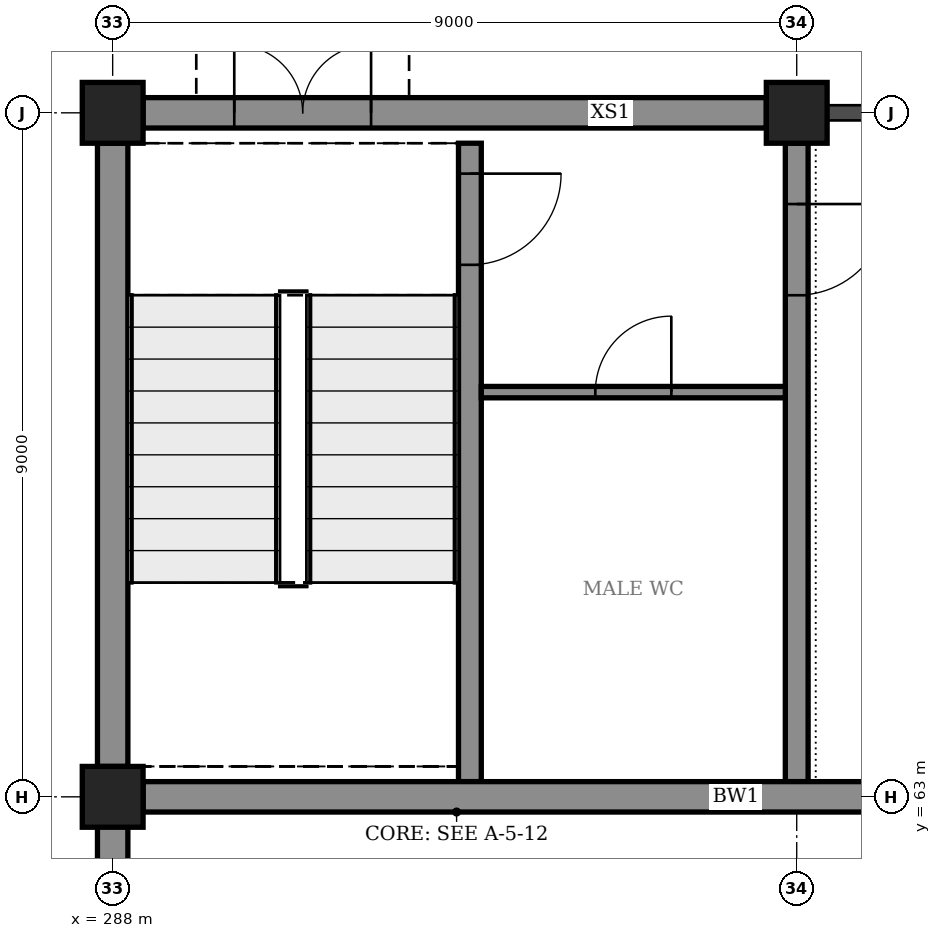
"""IFC4 building model, lengths in metres.
Left out: names, types, materials, properties, quantities, classifications, styles, units other than length and angle.
Written with IfcOpenShell. Run it as: python <this file> out.ifc"""

import sys

from ifc_helpers import new_model, si_unit, direction, frame, frame_2d, origin, origin_2d, place, context, subcontext, project, spatial, polyline, rectangle, outline, extrude, element, fill, save


model = new_model("IFC4")
c1 = context("Model", 3, precision=1e-05, world=origin(), true_north=direction((0.0, 1.0)))
c2 = subcontext(c1, "Body", "Model", "MODEL_VIEW")
j1 = project(units=[si_unit("LENGTHUNIT", "METRE"), si_unit("PLANEANGLEUNIT", "RADIAN")], contexts=[c1])
p1 = place(None, origin())
s1 = spatial("IfcSite", under=j1, at=p1, CompositionType="ELEMENT")
p2 = place(p1, origin())
s2 = spatial("IfcBuilding", under=s1, at=p2, CompositionType="ELEMENT")
p3 = place(p2, origin())
s3 = spatial("IfcBuildingStorey", under=s2, at=p3, CompositionType="ELEMENT", Elevation=0.0)
for number, where, z_axis, x_axis in (
    (1, (288.0, 63.0, -0.3), (0.0, 0.0, 1.0), (1.0, 0.0, 0.0)),
    (2, (288.0, 72.0, -0.3), (0.0, 0.0, 1.0), (1.0, 0.0, 0.0)),
    (3, (297.0, 72.0, -0.3), (0.0, 0.0, 1.0), (1.0, 0.0, 0.0)),
):
    element("IfcColumn", number, at=place(p3, frame(where, z_axis=z_axis, x_axis=x_axis)), inside=s3, PredefinedType="COLUMN", context=c2, shape_type="SweptSolid", body=[
        extrude(rectangle(XDim=0.8, YDim=0.8, at=origin_2d()), origin(), (0.0, 0.0, 1.0), 6.02),
    ])
p4 = place(p3, frame((288.4, 63.0, -0.3), z_axis=(0.0, 0.0, 1.0), x_axis=(1.0, 0.0, 0.0)))
e4 = element("IfcWall", 4, at=p4, inside=s3, PredefinedType="SHEAR", context=c2, shape_type="SweptSolid", body=[
    extrude(rectangle(XDim=62.2, YDim=0.4, at=frame_2d((31.1, 0.0))), origin(), (0.0, 0.0, 1.0), 10.625),
])
p5 = place(p4, frame((14.25, 0.0, 0.3)))
e5 = element("IfcOpeningElement", 5, at=p5, cuts=e4, PredefinedType="OPENING", context=c2, shape_type="SweptSolid", body=[
    extrude(rectangle(XDim=2.7, YDim=2.4, at=frame_2d((1.35, 1.2))), frame((0.0, 0.21, 0.0), z_axis=(0.0, -1.0, 0.0), x_axis=(1.0, 0.0, 0.0)), (0.0, 0.0, 1.0), 0.42),
])
p6 = place(p4, frame((19.45, 0.0, 0.3)))
e6 = element("IfcOpeningElement", 6, at=p6, cuts=e4, PredefinedType="OPENING", context=c2, shape_type="SweptSolid", body=[
    extrude(rectangle(XDim=2.7, YDim=2.4, at=frame_2d((1.35, 1.2))), frame((0.0, 0.21, 0.0), z_axis=(0.0, -1.0, 0.0), x_axis=(1.0, 0.0, 0.0)), (0.0, 0.0, 1.0), 0.42),
])
p7 = place(p4, frame((24.65, 0.0, 0.3)))
e7 = element("IfcOpeningElement", 7, at=p7, cuts=e4, PredefinedType="OPENING", context=c2, shape_type="SweptSolid", body=[
    extrude(rectangle(XDim=2.7, YDim=2.4, at=frame_2d((1.35, 1.2))), frame((0.0, 0.21, 0.0), z_axis=(0.0, -1.0, 0.0), x_axis=(1.0, 0.0, 0.0)), (0.0, 0.0, 1.0), 0.42),
])
p8 = place(p4, frame((29.85, 0.0, 0.3)))
e8 = element("IfcOpeningElement", 8, at=p8, cuts=e4, PredefinedType="OPENING", context=c2, shape_type="SweptSolid", body=[
    extrude(rectangle(XDim=2.7, YDim=2.4, at=frame_2d((1.35, 1.2))), frame((0.0, 0.21, 0.0), z_axis=(0.0, -1.0, 0.0), x_axis=(1.0, 0.0, 0.0)), (0.0, 0.0, 1.0), 0.42),
])
p9 = place(p4, frame((35.05, 0.0, 0.3)))
e9 = element("IfcOpeningElement", 9, at=p9, cuts=e4, PredefinedType="OPENING", context=c2, shape_type="SweptSolid", body=[
    extrude(rectangle(XDim=2.7, YDim=2.4, at=frame_2d((1.35, 1.2))), frame((0.0, 0.21, 0.0), z_axis=(0.0, -1.0, 0.0), x_axis=(1.0, 0.0, 0.0)), (0.0, 0.0, 1.0), 0.42),
])
p10 = place(p4, frame((40.25, 0.0, 0.3)))
e10 = element("IfcOpeningElement", 10, at=p10, cuts=e4, PredefinedType="OPENING", context=c2, shape_type="SweptSolid", body=[
    extrude(rectangle(XDim=2.7, YDim=2.4, at=frame_2d((1.35, 1.2))), frame((0.0, 0.21, 0.0), z_axis=(0.0, -1.0, 0.0), x_axis=(1.0, 0.0, 0.0)), (0.0, 0.0, 1.0), 0.42),
])
p11 = place(p4, frame((45.45, 0.0, 0.3)))
e11 = element("IfcOpeningElement", 11, at=p11, cuts=e4, PredefinedType="OPENING", context=c2, shape_type="SweptSolid", body=[
    extrude(rectangle(XDim=2.7, YDim=2.4, at=frame_2d((1.35, 1.2))), frame((0.0, 0.21, 0.0), z_axis=(0.0, -1.0, 0.0), x_axis=(1.0, 0.0, 0.0)), (0.0, 0.0, 1.0), 0.42),
])
p12 = place(p3, frame((288.0, 27.4, 0.0), z_axis=(0.0, 0.0, 1.0), x_axis=(0.0, 1.0, 0.0)))
e12 = element("IfcWall", 12, at=p12, inside=s3, PredefinedType="STANDARD", context=c2, shape_type="SweptSolid", body=[
    extrude(outline(polyline([(0.0, 0.0), (35.2, 0.0), (35.2, 9.75), (35.5, 9.75), (35.5, 17.708), (0.0, 11.448), (0.0, 0.0)])), frame((0.0, 0.2, 0.0), z_axis=(0.0, -1.0, 0.0), x_axis=(1.0, 0.0, 0.0)), (0.0, 0.0, 1.0), 0.4),
])
p13 = place(p12, frame((2.75, 0.0, 0.0)))
e13 = element("IfcOpeningElement", 13, at=p13, cuts=e12, PredefinedType="OPENING", context=c2, shape_type="SweptSolid", body=[
    extrude(rectangle(XDim=2.7, YDim=2.4, at=frame_2d((1.35, 1.2))), frame((0.0, 0.21, 0.0), z_axis=(0.0, -1.0, 0.0), x_axis=(1.0, 0.0, 0.0)), (0.0, 0.0, 1.0), 0.42),
])
p14 = place(p12, frame((11.75, 0.0, 0.0)))
e14 = element("IfcOpeningElement", 14, at=p14, cuts=e12, PredefinedType="OPENING", context=c2, shape_type="SweptSolid", body=[
    extrude(rectangle(XDim=2.7, YDim=2.4, at=frame_2d((1.35, 1.2))), frame((0.0, 0.21, 0.0), z_axis=(0.0, -1.0, 0.0), x_axis=(1.0, 0.0, 0.0)), (0.0, 0.0, 1.0), 0.42),
])
p15 = place(p12, frame((20.75, 0.0, 0.0)))
e15 = element("IfcOpeningElement", 15, at=p15, cuts=e12, PredefinedType="OPENING", context=c2, shape_type="SweptSolid", body=[
    extrude(rectangle(XDim=2.7, YDim=2.4, at=frame_2d((1.35, 1.2))), frame((0.0, 0.21, 0.0), z_axis=(0.0, -1.0, 0.0), x_axis=(1.0, 0.0, 0.0)), (0.0, 0.0, 1.0), 0.42),
])
p16 = place(p12, frame((29.75, 0.0, 0.0)))
e16 = element("IfcOpeningElement", 16, at=p16, cuts=e12, PredefinedType="OPENING", context=c2, shape_type="SweptSolid", body=[
    extrude(rectangle(XDim=2.7, YDim=2.4, at=frame_2d((1.35, 1.2))), frame((0.0, 0.21, 0.0), z_axis=(0.0, -1.0, 0.0), x_axis=(1.0, 0.0, 0.0)), (0.0, 0.0, 1.0), 0.42),
])
p17 = place(p3, frame((288.0, 63.4, 0.0), z_axis=(0.0, 0.0, 1.0), x_axis=(0.0, 1.0, 0.0)))
e17 = element("IfcWall", 17, at=p17, inside=s3, PredefinedType="STANDARD", context=c2, shape_type="SweptSolid", body=[
    extrude(rectangle(XDim=8.2, YDim=0.4, at=frame_2d((4.1, 0.0))), origin(), (0.0, 0.0, 1.0), 5.02),
])
p18 = place(p3, frame((288.4, 72.0, 0.0), z_axis=(0.0, 0.0, 1.0), x_axis=(1.0, 0.0, 0.0)))
e18 = element("IfcWall", 18, at=p18, inside=s3, PredefinedType="STANDARD", context=c2, shape_type="SweptSolid", body=[
    extrude(rectangle(XDim=8.2, YDim=0.4, at=frame_2d((4.1, 0.0))), origin(), (0.0, 0.0, 1.0), 5.02),
])
p19 = place(p18, frame((1.2, 0.0, 0.0)))
e19 = element("IfcOpeningElement", 19, at=p19, cuts=e18, PredefinedType="OPENING", context=c2, shape_type="SweptSolid", body=[
    extrude(rectangle(XDim=1.8, YDim=2.4, at=frame_2d((0.9, 1.2))), frame((0.0, 0.21, 0.0), z_axis=(0.0, -1.0, 0.0), x_axis=(1.0, 0.0, 0.0)), (0.0, 0.0, 1.0), 0.42),
])
p20 = place(p3, frame((292.7, 63.2, 0.0), z_axis=(0.0, 0.0, 1.0), x_axis=(0.0, 1.0, 0.0)))
e20 = element("IfcWall", 20, at=p20, inside=s3, PredefinedType="STANDARD", context=c2, shape_type="SweptSolid", body=[
    extrude(rectangle(XDim=8.4, YDim=0.3, at=frame_2d((4.2, 0.0))), origin(), (0.0, 0.0, 1.0), 5.72),
])
p21 = place(p20, frame((6.8, 0.0, 0.0)))
e21 = element("IfcOpeningElement", 21, at=p21, cuts=e20, PredefinedType="OPENING", context=c2, shape_type="SweptSolid", body=[
    extrude(rectangle(XDim=1.2, YDim=2.4, at=frame_2d((0.6, 1.2))), frame((0.0, 0.16, 0.0), z_axis=(0.0, -1.0, 0.0), x_axis=(1.0, 0.0, 0.0)), (0.0, 0.0, 1.0), 0.32),
])
p22 = place(p3, frame((297.0, 63.2, 0.0), z_axis=(0.0, 0.0, 1.0), x_axis=(0.0, 1.0, 0.0)))
e22 = element("IfcWall", 22, at=p22, inside=s3, PredefinedType="STANDARD", context=c2, shape_type="SweptSolid", body=[
    extrude(rectangle(XDim=8.4, YDim=0.3, at=frame_2d((4.2, 0.0))), origin(), (0.0, 0.0, 1.0), 5.02),
])
p23 = place(p22, frame((6.4, 0.0, 0.0)))
e23 = element("IfcOpeningElement", 23, at=p23, cuts=e22, PredefinedType="OPENING", context=c2, shape_type="SweptSolid", body=[
    extrude(rectangle(XDim=1.2, YDim=2.4, at=frame_2d((0.6, 1.2))), frame((0.0, 0.16, 0.0), z_axis=(0.0, -1.0, 0.0), x_axis=(1.0, 0.0, 0.0)), (0.0, 0.0, 1.0), 0.32),
])
p24 = place(p3, frame((292.85, 68.325, 0.0), z_axis=(0.0, 0.0, 1.0), x_axis=(1.0, 0.0, 0.0)))
e24 = element("IfcWall", 24, at=p24, inside=s3, PredefinedType="PARTITIONING", context=c2, shape_type="SweptSolid", body=[
    extrude(rectangle(XDim=4.0, YDim=0.15, at=frame_2d((2.0, 0.0))), origin(), (0.0, 0.0, 1.0), 5.72),
])
p25 = place(p24, frame((1.5, 0.0, 0.0)))
e25 = element("IfcOpeningElement", 25, at=p25, cuts=e24, PredefinedType="OPENING", context=c2, shape_type="SweptSolid", body=[
    extrude(rectangle(XDim=1.0, YDim=2.4, at=frame_2d((0.5, 1.2))), frame((0.0, 0.085, 0.0), z_axis=(0.0, -1.0, 0.0), x_axis=(1.0, 0.0, 0.0)), (0.0, 0.0, 1.0), 0.17),
])
p26 = place(p19, origin())
e26 = element("IfcDoor", 26, at=p26, inside=s3, OperationType="DOUBLE_DOOR_SINGLE_SWING", PredefinedType="DOOR", context=c2, shape_type="SweptSolid", body=[
    extrude(rectangle(XDim=1.8, YDim=2.4, at=frame_2d((0.9, 1.2))), frame((0.0, 0.025, 0.0), z_axis=(0.0, -1.0, 0.0), x_axis=(1.0, 0.0, 0.0)), (0.0, 0.0, 1.0), 0.05),
])
fill(e19, e26)
p27 = place(p21, frame((1.2, 0.0, 0.0), z_axis=(0.0, 0.0, 1.0), x_axis=(-1.0, 0.0, 0.0)))
e27 = element("IfcDoor", 27, at=p27, inside=s3, OperationType="SINGLE_SWING_RIGHT", PredefinedType="DOOR", context=c2, shape_type="SweptSolid", body=[
    extrude(rectangle(XDim=1.2, YDim=2.4, at=frame_2d((0.6, 1.2))), frame((0.0, 0.025, 0.0), z_axis=(0.0, -1.0, 0.0), x_axis=(1.0, 0.0, 0.0)), (0.0, 0.0, 1.0), 0.05),
])
fill(e21, e27)
p28 = place(p23, frame((1.2, 0.0, 0.0), z_axis=(0.0, 0.0, 1.0), x_axis=(-1.0, 0.0, 0.0)))
e28 = element("IfcDoor", 28, at=p28, inside=s3, OperationType="SINGLE_SWING_RIGHT", PredefinedType="DOOR", context=c2, shape_type="SweptSolid", body=[
    extrude(rectangle(XDim=1.2, YDim=2.4, at=frame_2d((0.6, 1.2))), frame((0.0, 0.025, 0.0), z_axis=(0.0, -1.0, 0.0), x_axis=(1.0, 0.0, 0.0)), (0.0, 0.0, 1.0), 0.05),
])
fill(e23, e28)
p29 = place(p25, origin())
e29 = element("IfcDoor", 29, at=p29, inside=s3, OperationType="SINGLE_SWING_RIGHT", PredefinedType="DOOR", context=c2, shape_type="SweptSolid", body=[
    extrude(rectangle(XDim=1.0, YDim=2.4, at=frame_2d((0.5, 1.2))), frame((0.0, 0.025, 0.0), z_axis=(0.0, -1.0, 0.0), x_axis=(1.0, 0.0, 0.0)), (0.0, 0.0, 1.0), 0.05),
])
fill(e25, e29)
save(model, sys.argv[1])
